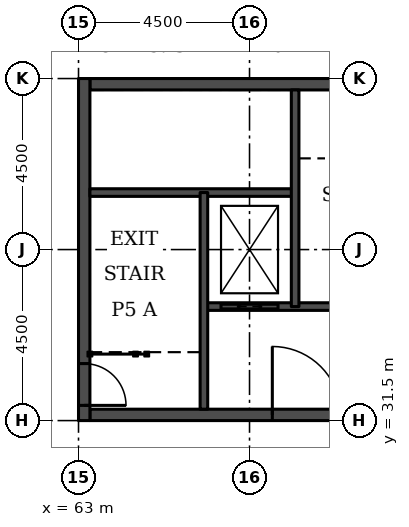
"""IFC4 building model, lengths in metres.
Left out: names, types, materials, properties, quantities, classifications, styles, units other than length and angle.
Written with IfcOpenShell. Run it as: python <this file> out.ifc"""

import sys

from ifc_helpers import new_model, si_unit, direction, frame, frame_2d, origin, place, context, subcontext, project, spatial, rectangle, extrude, element, fill, save


model = new_model("IFC4")
c1 = context("Model", 3, precision=1e-05, world=origin(), true_north=direction((0.0, 1.0)))
c2 = subcontext(c1, "Body", "Model", "MODEL_VIEW")
j1 = project(units=[si_unit("LENGTHUNIT", "METRE"), si_unit("PLANEANGLEUNIT", "RADIAN")], contexts=[c1])
p1 = place(None, origin())
s1 = spatial("IfcSite", under=j1, at=p1, CompositionType="ELEMENT")
p2 = place(p1, origin())
s2 = spatial("IfcBuilding", under=s1, at=p2, CompositionType="ELEMENT")
p3 = place(p2, frame((0.0, 0.0, 13.5)))
s3 = spatial("IfcBuildingStorey", under=s2, at=p3, CompositionType="ELEMENT", Elevation=13.5)
p4 = place(p3, frame((63.3, 31.65, 0.0), z_axis=(0.0, 0.0, 1.0), x_axis=(1.0, 0.0, 0.0)))
e1 = element("IfcWall", 1, at=p4, inside=s3, PredefinedType="SHEAR", context=c2, shape_type="SweptSolid", body=[
    extrude(rectangle(XDim=8.4, YDim=0.3, at=frame_2d((4.2, 0.0))), origin(), (0.0, 0.0, 1.0), 5.0),
])
p5 = place(p4, frame((4.8, 0.0, 0.0)))
e2 = element("IfcOpeningElement", 2, at=p5, cuts=e1, PredefinedType="OPENING", context=c2, shape_type="SweptSolid", body=[
    extrude(rectangle(XDim=1.8, YDim=2.1, at=frame_2d((0.9, 1.05))), frame((0.0, 0.16, 0.0), z_axis=(0.0, -1.0, 0.0), x_axis=(1.0, 0.0, 0.0)), (0.0, 0.0, 1.0), 0.32),
])
p6 = place(p3, frame((63.3, 40.35, 0.0), z_axis=(0.0, 0.0, 1.0), x_axis=(1.0, 0.0, 0.0)))
e3 = element("IfcWall", 3, at=p6, inside=s3, PredefinedType="SHEAR", context=c2, shape_type="SweptSolid", body=[
    extrude(rectangle(XDim=8.4, YDim=0.3, at=frame_2d((4.2, 0.0))), origin(), (0.0, 0.0, 1.0), 5.0),
])
p7 = place(p6, frame((6.4, 0.0, 0.0)))
e4 = element("IfcOpeningElement", 4, at=p7, cuts=e3, PredefinedType="OPENING", context=c2, shape_type="SweptSolid", body=[
    extrude(rectangle(XDim=1.1, YDim=2.1, at=frame_2d((0.55, 1.05))), frame((0.0, 0.16, 0.0), z_axis=(0.0, -1.0, 0.0), x_axis=(1.0, 0.0, 0.0)), (0.0, 0.0, 1.0), 0.32),
])
p8 = place(p3, frame((63.15, 31.5, 0.0), z_axis=(0.0, 0.0, 1.0), x_axis=(0.0, 1.0, 0.0)))
e5 = element("IfcWall", 5, at=p8, inside=s3, PredefinedType="SHEAR", context=c2, shape_type="SweptSolid", body=[
    extrude(rectangle(XDim=9.0, YDim=0.3, at=frame_2d((4.5, 0.0))), origin(), (0.0, 0.0, 1.0), 5.0),
])
p9 = place(p8, frame((0.4, 0.0, 0.0)))
e6 = element("IfcOpeningElement", 6, at=p9, cuts=e5, PredefinedType="OPENING", context=c2, shape_type="SweptSolid", body=[
    extrude(rectangle(XDim=1.1, YDim=2.1, at=frame_2d((0.55, 1.05))), frame((0.0, 0.16, 0.0), z_axis=(0.0, -1.0, 0.0), x_axis=(1.0, 0.0, 0.0)), (0.0, 0.0, 1.0), 0.32),
])
p10 = place(p3, frame((66.3, 34.5, 0.0), z_axis=(0.0, 0.0, 1.0), x_axis=(1.0, 0.0, 0.0)))
e7 = element("IfcWall", 7, at=p10, inside=s3, PredefinedType="SOLIDWALL", context=c2, shape_type="SweptSolid", body=[
    extrude(rectangle(XDim=5.4, YDim=0.2, at=frame_2d((2.7, 0.0))), origin(), (0.0, 0.0, 1.0), 4.78),
])
p11 = place(p10, frame((0.45, 0.0, 0.0)))
e8 = element("IfcOpeningElement", 8, at=p11, cuts=e7, PredefinedType="OPENING", context=c2, shape_type="SweptSolid", body=[
    extrude(rectangle(XDim=1.5, YDim=2.1, at=frame_2d((0.75, 1.05))), frame((0.0, 0.11, 0.0), z_axis=(0.0, -1.0, 0.0), x_axis=(1.0, 0.0, 0.0)), (0.0, 0.0, 1.0), 0.22),
])
p12 = place(p3, frame((63.3, 37.5, 0.0), z_axis=(0.0, 0.0, 1.0), x_axis=(1.0, 0.0, 0.0)))
e9 = element("IfcWall", 9, at=p12, inside=s3, PredefinedType="SOLIDWALL", context=c2, shape_type="SweptSolid", body=[
    extrude(rectangle(XDim=5.4, YDim=0.2, at=frame_2d((2.7, 0.0))), origin(), (0.0, 0.0, 1.0), 4.78),
])
for number, where, z_axis, x_axis in (
    (10, (66.3, 31.8, 0.0), (0.0, 0.0, 1.0), (0.0, 1.0, 0.0)),
    (11, (68.7, 34.5, 0.0), (0.0, 0.0, 1.0), (0.0, 1.0, 0.0)),
):
    element("IfcWall", number, at=place(p3, frame(where, z_axis=z_axis, x_axis=x_axis)), inside=s3, PredefinedType="SOLIDWALL", context=c2, shape_type="SweptSolid", body=[
        extrude(rectangle(XDim=5.7, YDim=0.2, at=frame_2d((2.85, 0.0))), origin(), (0.0, 0.0, 1.0), 4.78),
    ])
p13 = place(p9, frame((1.1, 0.0, 0.0), z_axis=(0.0, 0.0, 1.0), x_axis=(-1.0, 0.0, 0.0)))
e12 = element("IfcDoor", 12, at=p13, inside=s3, OperationType="SINGLE_SWING_RIGHT", PredefinedType="DOOR", context=c2, shape_type="SweptSolid", body=[
    extrude(rectangle(XDim=1.1, YDim=2.1, at=frame_2d((0.55, 1.05))), frame((0.0, 0.025, 0.0), z_axis=(0.0, -1.0, 0.0), x_axis=(1.0, 0.0, 0.0)), (0.0, 0.0, 1.0), 0.05),
])
fill(e6, e12)
p14 = place(p11, origin())
e13 = element("IfcDoor", 13, at=p14, inside=s3, OperationType="DOUBLE_DOOR_SLIDING", PredefinedType="DOOR", context=c2, shape_type="SweptSolid", body=[
    extrude(rectangle(XDim=1.5, YDim=2.1, at=frame_2d((0.75, 1.05))), frame((0.0, 0.025, 0.0), z_axis=(0.0, -1.0, 0.0), x_axis=(1.0, 0.0, 0.0)), (0.0, 0.0, 1.0), 0.05),
])
fill(e8, e13)
p15 = place(p5, origin())
e14 = element("IfcDoor", 14, at=p15, inside=s3, OperationType="SINGLE_SWING_LEFT", PredefinedType="DOOR", context=c2, shape_type="SweptSolid", body=[
    extrude(rectangle(XDim=1.8, YDim=2.1, at=frame_2d((0.9, 1.05))), frame((0.0, 0.025, 0.0), z_axis=(0.0, -1.0, 0.0), x_axis=(1.0, 0.0, 0.0)), (0.0, 0.0, 1.0), 0.05),
])
fill(e2, e14)
save(model, sys.argv[1])
